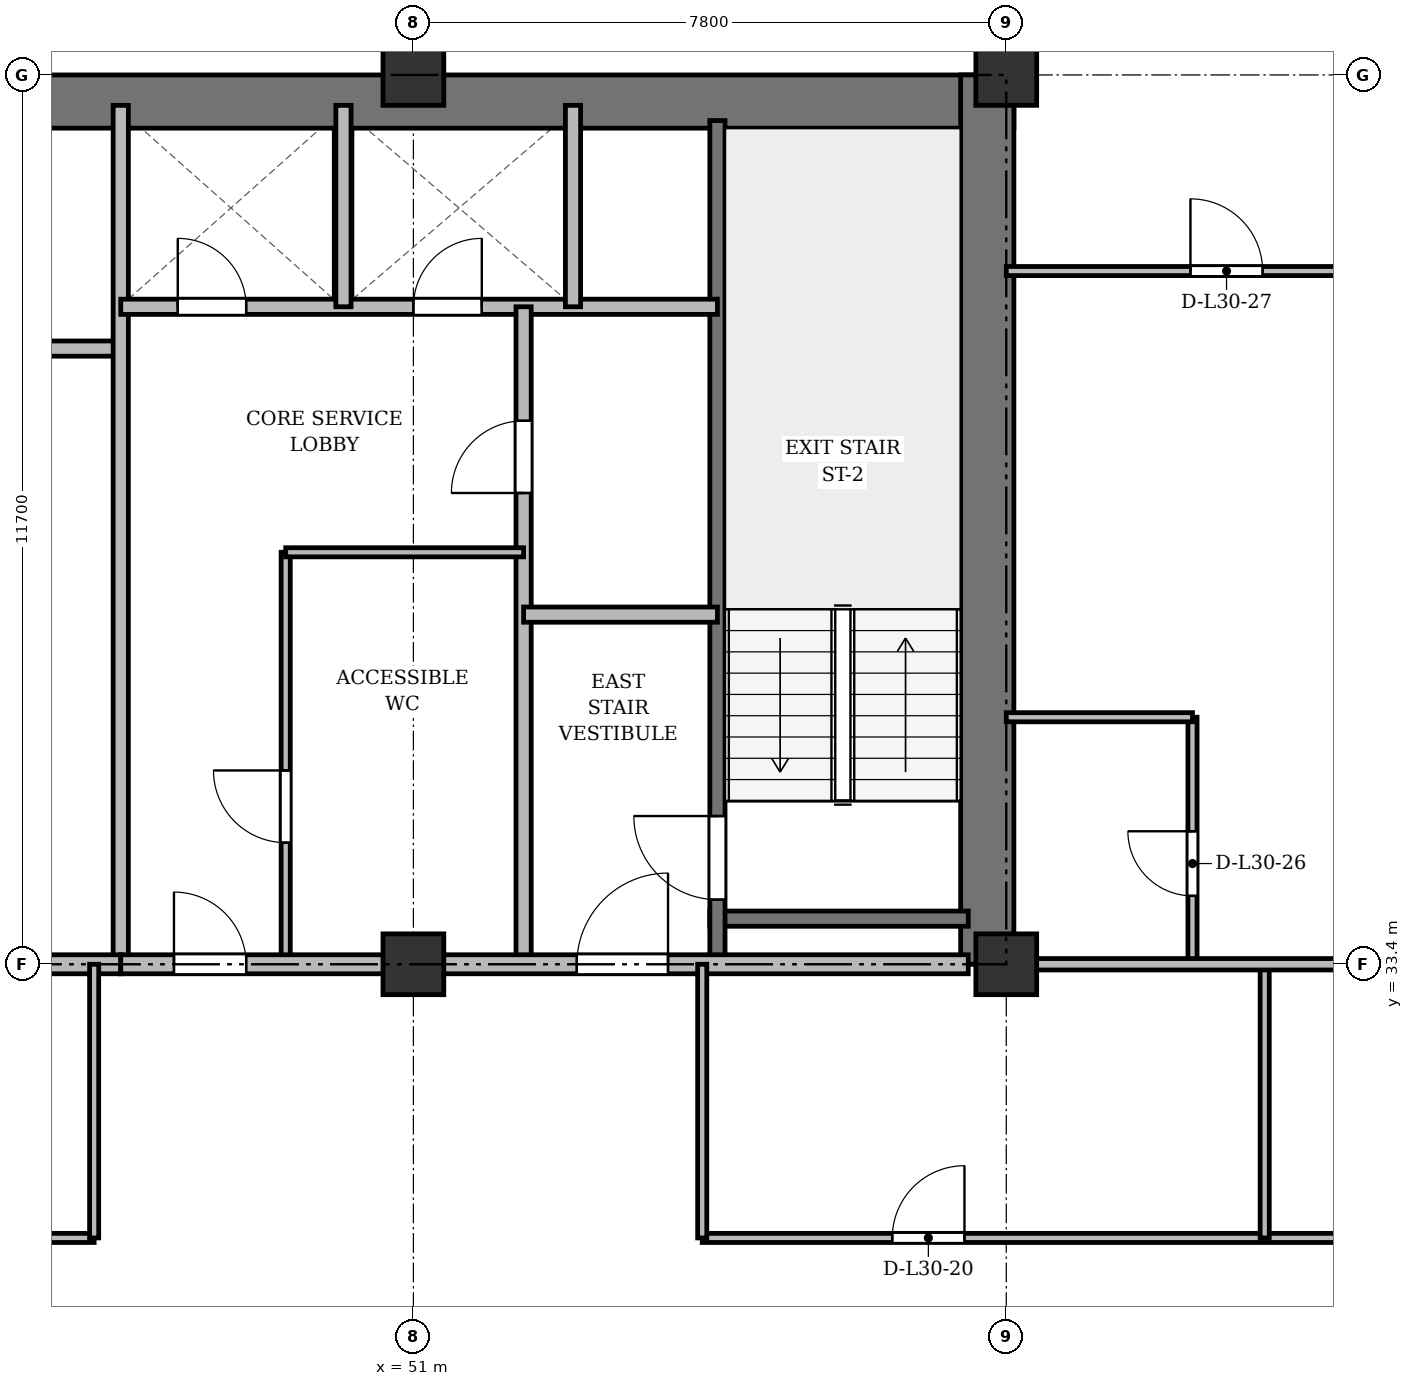
"""IFC4 building model, lengths in metres.
Left out: names, types, materials, properties, quantities, classifications, styles, units other than length and angle.
Written with IfcOpenShell. Run it as: python <this file> out.ifc"""

import sys

from ifc_helpers import new_model, si_unit, direction, frame, frame_2d, origin, origin_2d, place, context, subcontext, project, spatial, rectangle, extrude, source, transform, mapped, element, fill, save


model = new_model("IFC4")
c1 = context("Model", 3, precision=1e-05, world=origin(), true_north=direction((0.0, 1.0)))
c2 = subcontext(c1, "Body", "Model", "MODEL_VIEW")
j1 = project(units=[si_unit("LENGTHUNIT", "METRE"), si_unit("PLANEANGLEUNIT", "RADIAN")], contexts=[c1])
p1 = place(None, origin())
s1 = spatial("IfcSite", under=j1, at=p1, CompositionType="ELEMENT")
p2 = place(p1, origin())
s2 = spatial("IfcBuilding", under=s1, at=p2, CompositionType="ELEMENT")
p3 = place(p2, frame((0.0, 0.0, 117.7)))
s3 = spatial("IfcBuildingStorey", under=s2, at=p3, CompositionType="ELEMENT", Elevation=117.7)
m1 = source(origin(), c2, "Body", "SweptSolid", [
    extrude(rectangle(XDim=0.8, YDim=0.8, at=origin_2d()), origin(), (0.0, 0.0, 1.0), 3.6),
])
for number, where, z_axis, x_axis in (
    (1, (51.0, 33.4, 0.0), (0.0, 0.0, 1.0), (1.0, 0.0, 0.0)),
    (2, (51.0, 45.1, 0.0), (0.0, 0.0, 1.0), (1.0, 0.0, 0.0)),
    (3, (58.8, 33.4, 0.0), (0.0, 0.0, 1.0), (1.0, 0.0, 0.0)),
    (4, (58.8, 45.1, 0.0), (0.0, 0.0, 1.0), (1.0, 0.0, 0.0)),
):
    element("IfcColumn", number, at=place(p3, frame(where, z_axis=z_axis, x_axis=x_axis)), inside=s3, PredefinedType="COLUMN", context=c2, shape_type="MappedRepresentation", body=[
        mapped(m1, transform((0.0, 0.0, 0.0), x_axis=(1.0, 0.0, 0.0), y_axis=(0.0, 1.0, 0.0), z_axis=(0.0, 0.0, 1.0), scale=1.0)),
    ])
p4 = place(p3, frame((15.5, 44.75, 0.0), z_axis=(0.0, 0.0, 1.0), x_axis=(1.0, 0.0, 0.0)))
e5 = element("IfcWall", 5, at=p4, inside=s3, PredefinedType="SHEAR", context=c2, shape_type="SweptSolid", body=[
    extrude(rectangle(XDim=43.4, YDim=0.7, at=frame_2d((21.7, 0.0))), origin(), (0.0, 0.0, 1.0), 3.34),
])
p5 = place(p3, frame((58.55, 33.4, 0.0), z_axis=(0.0, 0.0, 1.0), x_axis=(0.0, 1.0, 0.0)))
e6 = element("IfcWall", 6, at=p5, inside=s3, PredefinedType="SHEAR", context=c2, shape_type="SweptSolid", body=[
    extrude(rectangle(XDim=11.7, YDim=0.7, at=frame_2d((5.85, 0.0))), origin(), (0.0, 0.0, 1.0), 3.34),
])
p6 = place(p3, frame((54.9, 34.0, 0.0), z_axis=(0.0, 0.0, 1.0), x_axis=(1.0, 0.0, 0.0)))
e7 = element("IfcWall", 7, at=p6, inside=s3, PredefinedType="SHEAR", context=c2, shape_type="SweptSolid", body=[
    extrude(rectangle(XDim=3.4, YDim=0.2, at=frame_2d((1.7, 0.0))), origin(), (0.0, 0.0, 1.0), 3.34),
])
p7 = place(p3, frame((55.0, 33.4, 0.0), z_axis=(0.0, 0.0, 1.0), x_axis=(0.0, 1.0, 0.0)))
e8 = element("IfcWall", 8, at=p7, inside=s3, PredefinedType="SHEAR", context=c2, shape_type="SweptSolid", body=[
    extrude(rectangle(XDim=11.1, YDim=0.2, at=frame_2d((5.55, 0.0))), origin(), (0.0, 0.0, 1.0), 3.34),
])
p8 = place(p7, frame((0.85, 0.0, 0.0)))
e9 = element("IfcOpeningElement", 9, at=p8, cuts=e8, PredefinedType="OPENING", context=c2, shape_type="SweptSolid", body=[
    extrude(rectangle(XDim=1.1, YDim=2.15, at=frame_2d((0.55, 1.075))), frame((0.0, 0.11, 0.0), z_axis=(0.0, -1.0, 0.0), x_axis=(1.0, 0.0, 0.0)), (0.0, 0.0, 1.0), 0.22),
])
p9 = place(p3, frame((40.25, 41.5, 0.0), z_axis=(0.0, 0.0, 1.0), x_axis=(1.0, 0.0, 0.0)))
e10 = element("IfcWall", 10, at=p9, inside=s3, PredefinedType="SOLIDWALL", context=c2, shape_type="SweptSolid", body=[
    extrude(rectangle(XDim=6.9, YDim=0.2, at=frame_2d((3.45, 0.0))), origin(), (0.0, 0.0, 1.0), 2.84),
])
p10 = place(p3, frame((47.15, 33.4, 0.0), z_axis=(0.0, 0.0, 1.0), x_axis=(0.0, 1.0, 0.0)))
e11 = element("IfcWall", 11, at=p10, inside=s3, PredefinedType="SOLIDWALL", context=c2, shape_type="SweptSolid", body=[
    extrude(rectangle(XDim=11.3, YDim=0.2, at=frame_2d((5.65, 0.0))), origin(), (0.0, 0.0, 1.0), 2.752),
])
p11 = place(p3, frame((26.3, 33.4, 0.0), z_axis=(0.0, 0.0, 1.0), x_axis=(1.0, 0.0, 0.0)))
e12 = element("IfcWall", 12, at=p11, inside=s3, PredefinedType="PARTITIONING", context=c2, shape_type="SweptSolid", body=[
    extrude(rectangle(XDim=20.85, YDim=0.25, at=frame_2d((10.425, 0.0))), origin(), (0.0, 0.0, 1.0), 2.752),
])
p12 = place(p11, frame((9.2, 0.0, 0.0)))
e13 = element("IfcOpeningElement", 13, at=p12, cuts=e12, PredefinedType="OPENING", context=c2, shape_type="SweptSolid", body=[
    extrude(rectangle(XDim=1.6, YDim=2.2, at=frame_2d((0.8, 1.1))), frame((0.0, 0.135, 0.0), z_axis=(0.0, -1.0, 0.0), x_axis=(1.0, 0.0, 0.0)), (0.0, 0.0, 1.0), 0.27),
])
p13 = place(p3, frame((47.15, 42.05, 0.0), z_axis=(0.0, 0.0, 1.0), x_axis=(1.0, 0.0, 0.0)))
e14 = element("IfcWall", 14, at=p13, inside=s3, PredefinedType="SOLIDWALL", context=c2, shape_type="SweptSolid", body=[
    extrude(rectangle(XDim=7.85, YDim=0.2, at=frame_2d((3.925, 0.0))), origin(), (0.0, 0.0, 1.0), 2.84),
])
p14 = place(p13, frame((0.75, 0.0, 0.0)))
e15 = element("IfcOpeningElement", 15, at=p14, cuts=e14, PredefinedType="OPENING", context=c2, shape_type="SweptSolid", body=[
    extrude(rectangle(XDim=0.9, YDim=2.1, at=frame_2d((0.45, 1.05))), frame((0.0, 0.11, 0.0), z_axis=(0.0, -1.0, 0.0), x_axis=(1.0, 0.0, 0.0)), (0.0, 0.0, 1.0), 0.22),
])
p15 = place(p13, frame((3.85, 0.0, 0.0)))
e16 = element("IfcOpeningElement", 16, at=p15, cuts=e14, PredefinedType="OPENING", context=c2, shape_type="SweptSolid", body=[
    extrude(rectangle(XDim=0.9, YDim=2.1, at=frame_2d((0.45, 1.05))), frame((0.0, 0.11, 0.0), z_axis=(0.0, -1.0, 0.0), x_axis=(1.0, 0.0, 0.0)), (0.0, 0.0, 1.0), 0.22),
])
for number, where, z_axis, x_axis in (
    (17, (50.08, 42.05, 0.0), (0.0, 0.0, 1.0), (0.0, 1.0, 0.0)),
    (18, (53.1, 42.05, 0.0), (0.0, 0.0, 1.0), (0.0, 1.0, 0.0)),
):
    element("IfcWall", number, at=place(p3, frame(where, z_axis=z_axis, x_axis=x_axis)), inside=s3, PredefinedType="SOLIDWALL", context=c2, shape_type="SweptSolid", body=[
        extrude(rectangle(XDim=2.65, YDim=0.2, at=frame_2d((1.325, 0.0))), origin(), (0.0, 0.0, 1.0), 3.34),
    ])
p16 = place(p3, frame((52.45, 33.4, 0.0), z_axis=(0.0, 0.0, 1.0), x_axis=(0.0, 1.0, 0.0)))
e19 = element("IfcWall", 19, at=p16, inside=s3, PredefinedType="PARTITIONING", context=c2, shape_type="SweptSolid", body=[
    extrude(rectangle(XDim=8.65, YDim=0.2, at=frame_2d((4.325, 0.0))), origin(), (0.0, 0.0, 1.0), 2.752),
])
p17 = place(p16, frame((6.2, 0.0, 0.0)))
e20 = element("IfcOpeningElement", 20, at=p17, cuts=e19, PredefinedType="OPENING", context=c2, shape_type="SweptSolid", body=[
    extrude(rectangle(XDim=0.95, YDim=2.15, at=frame_2d((0.475, 1.075))), frame((0.0, 0.11, 0.0), z_axis=(0.0, -1.0, 0.0), x_axis=(1.0, 0.0, 0.0)), (0.0, 0.0, 1.0), 0.22),
])
p18 = place(p3, frame((52.45, 38.0, 0.0), z_axis=(0.0, 0.0, 1.0), x_axis=(1.0, 0.0, 0.0)))
e21 = element("IfcWall", 21, at=p18, inside=s3, PredefinedType="PARTITIONING", context=c2, shape_type="SweptSolid", body=[
    extrude(rectangle(XDim=2.55, YDim=0.2, at=frame_2d((1.275, 0.0))), origin(), (0.0, 0.0, 1.0), 3.34),
])
p19 = place(p3, frame((49.32, 33.4, 0.0), z_axis=(0.0, 0.0, 1.0), x_axis=(0.0, 1.0, 0.0)))
e22 = element("IfcWall", 22, at=p19, inside=s3, PredefinedType="PARTITIONING", context=c2, shape_type="SweptSolid", body=[
    extrude(rectangle(XDim=5.42, YDim=0.12, at=frame_2d((2.71, 0.0))), origin(), (0.0, 0.0, 1.0), 2.752),
])
p20 = place(p19, frame((1.6, 0.0, 0.0)))
e23 = element("IfcOpeningElement", 23, at=p20, cuts=e22, PredefinedType="OPENING", context=c2, shape_type="SweptSolid", body=[
    extrude(rectangle(XDim=0.95, YDim=2.15, at=frame_2d((0.475, 1.075))), frame((0.0, 0.07, 0.0), z_axis=(0.0, -1.0, 0.0), x_axis=(1.0, 0.0, 0.0)), (0.0, 0.0, 1.0), 0.14),
])
p21 = place(p3, frame((49.32, 38.82, 0.0), z_axis=(0.0, 0.0, 1.0), x_axis=(1.0, 0.0, 0.0)))
e24 = element("IfcWall", 24, at=p21, inside=s3, PredefinedType="PARTITIONING", context=c2, shape_type="SweptSolid", body=[
    extrude(rectangle(XDim=3.13, YDim=0.12, at=frame_2d((1.565, 0.0))), origin(), (0.0, 0.0, 1.0), 2.84),
])
p22 = place(p3, frame((47.15, 33.4, 0.0), z_axis=(0.0, 0.0, 1.0), x_axis=(1.0, 0.0, 0.0)))
e25 = element("IfcWall", 25, at=p22, inside=s3, PredefinedType="PARTITIONING", context=c2, shape_type="SweptSolid", body=[
    extrude(rectangle(XDim=11.15, YDim=0.25, at=frame_2d((5.575, 0.0))), origin(), (0.0, 0.0, 1.0), 2.752),
])
p23 = place(p22, frame((0.7, 0.0, 0.0)))
e26 = element("IfcOpeningElement", 26, at=p23, cuts=e25, PredefinedType="OPENING", context=c2, shape_type="SweptSolid", body=[
    extrude(rectangle(XDim=0.95, YDim=2.15, at=frame_2d((0.475, 1.075))), frame((0.0, 0.135, 0.0), z_axis=(0.0, -1.0, 0.0), x_axis=(1.0, 0.0, 0.0)), (0.0, 0.0, 1.0), 0.27),
])
p24 = place(p22, frame((6.0, 0.0, 0.0)))
e27 = element("IfcOpeningElement", 27, at=p24, cuts=e25, PredefinedType="OPENING", context=c2, shape_type="SweptSolid", body=[
    extrude(rectangle(XDim=1.2, YDim=2.15, at=frame_2d((0.6, 1.075))), frame((0.0, 0.135, 0.0), z_axis=(0.0, -1.0, 0.0), x_axis=(1.0, 0.0, 0.0)), (0.0, 0.0, 1.0), 0.27),
])
p25 = place(p3, frame((38.2, 29.8, 0.0), z_axis=(0.0, 0.0, 1.0), x_axis=(1.0, 0.0, 0.0)))
e28 = element("IfcWall", 28, at=p25, inside=s3, PredefinedType="PARTITIONING", context=c2, shape_type="SweptSolid", body=[
    extrude(rectangle(XDim=8.6, YDim=0.12, at=frame_2d((4.3, 0.0))), origin(), (0.0, 0.0, 1.0), 2.84),
])
p26 = place(p25, frame((3.462, 0.0, 0.0)))
e29 = element("IfcOpeningElement", 29, at=p26, cuts=e28, PredefinedType="OPENING", context=c2, shape_type="SweptSolid", body=[
    extrude(rectangle(XDim=0.95, YDim=2.15, at=frame_2d((0.475, 1.075))), frame((0.0, 0.07, 0.0), z_axis=(0.0, -1.0, 0.0), x_axis=(1.0, 0.0, 0.0)), (0.0, 0.0, 1.0), 0.14),
])
p27 = place(p3, frame((54.8, 29.8, 0.0), z_axis=(0.0, 0.0, 1.0), x_axis=(1.0, 0.0, 0.0)))
e30 = element("IfcWall", 30, at=p27, inside=s3, PredefinedType="PARTITIONING", context=c2, shape_type="SweptSolid", body=[
    extrude(rectangle(XDim=14.85, YDim=0.12, at=frame_2d((7.425, 0.0))), origin(), (0.0, 0.0, 1.0), 2.84),
])
p28 = place(p27, frame((2.5, 0.0, 0.0)))
e31 = element("IfcOpeningElement", 31, at=p28, cuts=e30, PredefinedType="OPENING", context=c2, shape_type="SweptSolid", body=[
    extrude(rectangle(XDim=0.95, YDim=2.15, at=frame_2d((0.475, 1.075))), frame((0.0, 0.07, 0.0), z_axis=(0.0, -1.0, 0.0), x_axis=(1.0, 0.0, 0.0)), (0.0, 0.0, 1.0), 0.14),
])
p29 = place(p27, frame((9.2, 0.0, 0.0)))
e32 = element("IfcOpeningElement", 32, at=p29, cuts=e30, PredefinedType="OPENING", context=c2, shape_type="SweptSolid", body=[
    extrude(rectangle(XDim=0.95, YDim=2.15, at=frame_2d((0.475, 1.075))), frame((0.0, 0.07, 0.0), z_axis=(0.0, -1.0, 0.0), x_axis=(1.0, 0.0, 0.0)), (0.0, 0.0, 1.0), 0.14),
])
for number, where, z_axis, x_axis in (
    (33, (62.2, 29.8, 0.0), (0.0, 0.0, 1.0), (0.0, 1.0, 0.0)),
    (34, (46.8, 29.8, 0.0), (0.0, 0.0, 1.0), (0.0, 1.0, 0.0)),
    (35, (54.8, 29.8, 0.0), (0.0, 0.0, 1.0), (0.0, 1.0, 0.0)),
):
    element("IfcWall", number, at=place(p3, frame(where, z_axis=z_axis, x_axis=x_axis)), inside=s3, PredefinedType="PARTITIONING", context=c2, shape_type="SweptSolid", body=[
        extrude(rectangle(XDim=3.6, YDim=0.12, at=frame_2d((1.8, 0.0))), origin(), (0.0, 0.0, 1.0), 2.752),
    ])
p30 = place(p3, frame((61.25, 33.4, 0.0), z_axis=(0.0, 0.0, 1.0), x_axis=(0.0, 1.0, 0.0)))
e36 = element("IfcWall", 36, at=p30, inside=s3, PredefinedType="PARTITIONING", context=c2, shape_type="SweptSolid", body=[
    extrude(rectangle(XDim=3.25, YDim=0.12, at=frame_2d((1.625, 0.0))), origin(), (0.0, 0.0, 1.0), 2.752),
])
p31 = place(p30, frame((0.9, 0.0, 0.0)))
e37 = element("IfcOpeningElement", 37, at=p31, cuts=e36, PredefinedType="OPENING", context=c2, shape_type="SweptSolid", body=[
    extrude(rectangle(XDim=0.85, YDim=2.1, at=frame_2d((0.425, 1.05))), frame((0.0, 0.07, 0.0), z_axis=(0.0, -1.0, 0.0), x_axis=(1.0, 0.0, 0.0)), (0.0, 0.0, 1.0), 0.14),
])
p32 = place(p3, frame((58.8, 36.65, 0.0), z_axis=(0.0, 0.0, 1.0), x_axis=(1.0, 0.0, 0.0)))
e38 = element("IfcWall", 38, at=p32, inside=s3, PredefinedType="PARTITIONING", context=c2, shape_type="SweptSolid", body=[
    extrude(rectangle(XDim=2.45, YDim=0.12, at=frame_2d((1.225, 0.0))), origin(), (0.0, 0.0, 1.0), 2.84),
])
p33 = place(p3, frame((58.8, 42.52, 0.0), z_axis=(0.0, 0.0, 1.0), x_axis=(1.0, 0.0, 0.0)))
e39 = element("IfcWall", 39, at=p33, inside=s3, PredefinedType="PARTITIONING", context=c2, shape_type="SweptSolid", body=[
    extrude(rectangle(XDim=5.425, YDim=0.12, at=frame_2d((2.712, 0.0))), origin(), (0.0, 0.0, 1.0), 2.84),
])
p34 = place(p33, frame((2.423, 0.0, 0.0)))
e40 = element("IfcOpeningElement", 40, at=p34, cuts=e39, PredefinedType="OPENING", context=c2, shape_type="SweptSolid", body=[
    extrude(rectangle(XDim=0.95, YDim=2.15, at=frame_2d((0.475, 1.075))), frame((0.0, 0.07, 0.0), z_axis=(0.0, -1.0, 0.0), x_axis=(1.0, 0.0, 0.0)), (0.0, 0.0, 1.0), 0.14),
])
p35 = place(p3, frame((58.8, 33.4, 0.0), z_axis=(0.0, 0.0, 1.0), x_axis=(1.0, 0.0, 0.0)))
e41 = element("IfcWall", 41, at=p35, inside=s3, PredefinedType="PARTITIONING", context=c2, shape_type="SweptSolid", body=[
    extrude(rectangle(XDim=10.85, YDim=0.15, at=frame_2d((5.425, 0.0))), origin(), (0.0, 0.0, 1.0), 2.752),
])
p36 = place(p35, frame((4.933, 0.0, 0.0)))
e42 = element("IfcOpeningElement", 42, at=p36, cuts=e41, PredefinedType="OPENING", context=c2, shape_type="SweptSolid", body=[
    extrude(rectangle(XDim=0.95, YDim=2.15, at=frame_2d((0.475, 1.075))), frame((0.0, 0.085, 0.0), z_axis=(0.0, -1.0, 0.0), x_axis=(1.0, 0.0, 0.0)), (0.0, 0.0, 1.0), 0.17),
])
p37 = place(p3, frame((58.8, 44.75, 0.0), z_axis=(0.0, 0.0, 1.0), x_axis=(0.0, 1.0, 0.0)))
e43 = element("IfcWall", 43, at=p37, inside=s3, PredefinedType="PARTITIONING", context=c2, shape_type="SweptSolid", body=[
    extrude(rectangle(XDim=3.61, YDim=0.15, at=frame_2d((1.805, 0.0))), origin(), (0.0, 0.0, 1.0), 2.84),
])
p38 = place(p37, frame((1.1, 0.0, 0.0)))
e44 = element("IfcOpeningElement", 44, at=p38, cuts=e43, PredefinedType="OPENING", context=c2, shape_type="SweptSolid", body=[
    extrude(rectangle(XDim=0.95, YDim=2.15, at=frame_2d((0.475, 1.075))), frame((0.0, 0.085, 0.0), z_axis=(0.0, -1.0, 0.0), x_axis=(1.0, 0.0, 0.0)), (0.0, 0.0, 1.0), 0.17),
])
m2 = source(origin(), c2, "Body", "SweptSolid", [
    extrude(rectangle(XDim=1.1, YDim=2.15, at=frame_2d((0.55, 1.075))), frame((0.0, 0.025, 0.0), z_axis=(0.0, -1.0, 0.0), x_axis=(1.0, 0.0, 0.0)), (0.0, 0.0, 1.0), 0.05),
])
p39 = place(p8, origin())
e45 = element("IfcDoor", 45, at=p39, inside=s3, OperationType="SINGLE_SWING_RIGHT", PredefinedType="DOOR", context=c2, shape_type="MappedRepresentation", body=[
    mapped(m2, transform((0.0, 0.0, 0.0), x_axis=(1.0, 0.0, 0.0), y_axis=(0.0, 1.0, 0.0), z_axis=(0.0, 0.0, 1.0), scale=1.0)),
])
fill(e9, e45)
m3 = source(origin(), c2, "Body", "SweptSolid", [
    extrude(rectangle(XDim=0.9, YDim=2.1, at=frame_2d((0.45, 1.05))), frame((0.0, 0.025, 0.0), z_axis=(0.0, -1.0, 0.0), x_axis=(1.0, 0.0, 0.0)), (0.0, 0.0, 1.0), 0.05),
])
p40 = place(p14, origin())
e46 = element("IfcDoor", 46, at=p40, inside=s3, OperationType="SINGLE_SWING_LEFT", PredefinedType="DOOR", context=c2, shape_type="MappedRepresentation", body=[
    mapped(m3, transform((0.0, 0.0, 0.0), x_axis=(1.0, 0.0, 0.0), y_axis=(0.0, 1.0, 0.0), z_axis=(0.0, 0.0, 1.0), scale=1.0)),
])
fill(e15, e46)
p41 = place(p15, origin())
e47 = element("IfcDoor", 47, at=p41, inside=s3, OperationType="SINGLE_SWING_RIGHT", PredefinedType="DOOR", context=c2, shape_type="MappedRepresentation", body=[
    mapped(m3, transform((0.0, 0.0, 0.0), x_axis=(1.0, 0.0, 0.0), y_axis=(0.0, 1.0, 0.0), z_axis=(0.0, 0.0, 1.0), scale=1.0)),
])
fill(e16, e47)
m4 = source(origin(), c2, "Body", "SweptSolid", [
    extrude(rectangle(XDim=0.95, YDim=2.15, at=frame_2d((0.475, 1.075))), frame((0.0, 0.025, 0.0), z_axis=(0.0, -1.0, 0.0), x_axis=(1.0, 0.0, 0.0)), (0.0, 0.0, 1.0), 0.05),
])
p42 = place(p17, origin())
e48 = element("IfcDoor", 48, at=p42, inside=s3, OperationType="SINGLE_SWING_LEFT", PredefinedType="DOOR", context=c2, shape_type="MappedRepresentation", body=[
    mapped(m4, transform((0.0, 0.0, 0.0), x_axis=(1.0, 0.0, 0.0), y_axis=(0.0, 1.0, 0.0), z_axis=(0.0, 0.0, 1.0), scale=1.0)),
])
fill(e20, e48)
p43 = place(p20, origin())
e49 = element("IfcDoor", 49, at=p43, inside=s3, OperationType="SINGLE_SWING_RIGHT", PredefinedType="DOOR", context=c2, shape_type="MappedRepresentation", body=[
    mapped(m4, transform((0.0, 0.0, 0.0), x_axis=(1.0, 0.0, 0.0), y_axis=(0.0, 1.0, 0.0), z_axis=(0.0, 0.0, 1.0), scale=1.0)),
])
fill(e23, e49)
p44 = place(p23, origin())
e50 = element("IfcDoor", 50, at=p44, inside=s3, OperationType="SINGLE_SWING_LEFT", PredefinedType="DOOR", context=c2, shape_type="MappedRepresentation", body=[
    mapped(m4, transform((0.0, 0.0, 0.0), x_axis=(1.0, 0.0, 0.0), y_axis=(0.0, 1.0, 0.0), z_axis=(0.0, 0.0, 1.0), scale=1.0)),
])
fill(e26, e50)
m5 = source(origin(), c2, "Body", "SweptSolid", [
    extrude(rectangle(XDim=1.2, YDim=2.15, at=frame_2d((0.6, 1.075))), frame((0.0, 0.025, 0.0), z_axis=(0.0, -1.0, 0.0), x_axis=(1.0, 0.0, 0.0)), (0.0, 0.0, 1.0), 0.05),
])
p45 = place(p24, origin())
e51 = element("IfcDoor", 51, at=p45, inside=s3, OperationType="SINGLE_SWING_RIGHT", PredefinedType="DOOR", context=c2, shape_type="MappedRepresentation", body=[
    mapped(m5, transform((0.0, 0.0, 0.0), x_axis=(1.0, 0.0, 0.0), y_axis=(0.0, 1.0, 0.0), z_axis=(0.0, 0.0, 1.0), scale=1.0)),
])
fill(e27, e51)
p46 = place(p28, origin())
e52 = element("IfcDoor", 52, at=p46, inside=s3, OperationType="SINGLE_SWING_RIGHT", PredefinedType="DOOR", context=c2, shape_type="MappedRepresentation", body=[
    mapped(m4, transform((0.0, 0.0, 0.0), x_axis=(1.0, 0.0, 0.0), y_axis=(0.0, 1.0, 0.0), z_axis=(0.0, 0.0, 1.0), scale=1.0)),
])
fill(e31, e52)
m6 = source(origin(), c2, "Body", "SweptSolid", [
    extrude(rectangle(XDim=0.85, YDim=2.1, at=frame_2d((0.425, 1.05))), frame((0.0, 0.025, 0.0), z_axis=(0.0, -1.0, 0.0), x_axis=(1.0, 0.0, 0.0)), (0.0, 0.0, 1.0), 0.05),
])
p47 = place(p31, origin())
e53 = element("IfcDoor", 53, at=p47, inside=s3, OperationType="SINGLE_SWING_RIGHT", PredefinedType="DOOR", context=c2, shape_type="MappedRepresentation", body=[
    mapped(m6, transform((0.0, 0.0, 0.0), x_axis=(1.0, 0.0, 0.0), y_axis=(0.0, 1.0, 0.0), z_axis=(0.0, 0.0, 1.0), scale=1.0)),
])
fill(e37, e53)
p48 = place(p34, origin())
e54 = element("IfcDoor", 54, at=p48, inside=s3, OperationType="SINGLE_SWING_LEFT", PredefinedType="DOOR", context=c2, shape_type="MappedRepresentation", body=[
    mapped(m4, transform((0.0, 0.0, 0.0), x_axis=(1.0, 0.0, 0.0), y_axis=(0.0, 1.0, 0.0), z_axis=(0.0, 0.0, 1.0), scale=1.0)),
])
fill(e40, e54)
save(model, sys.argv[1])
